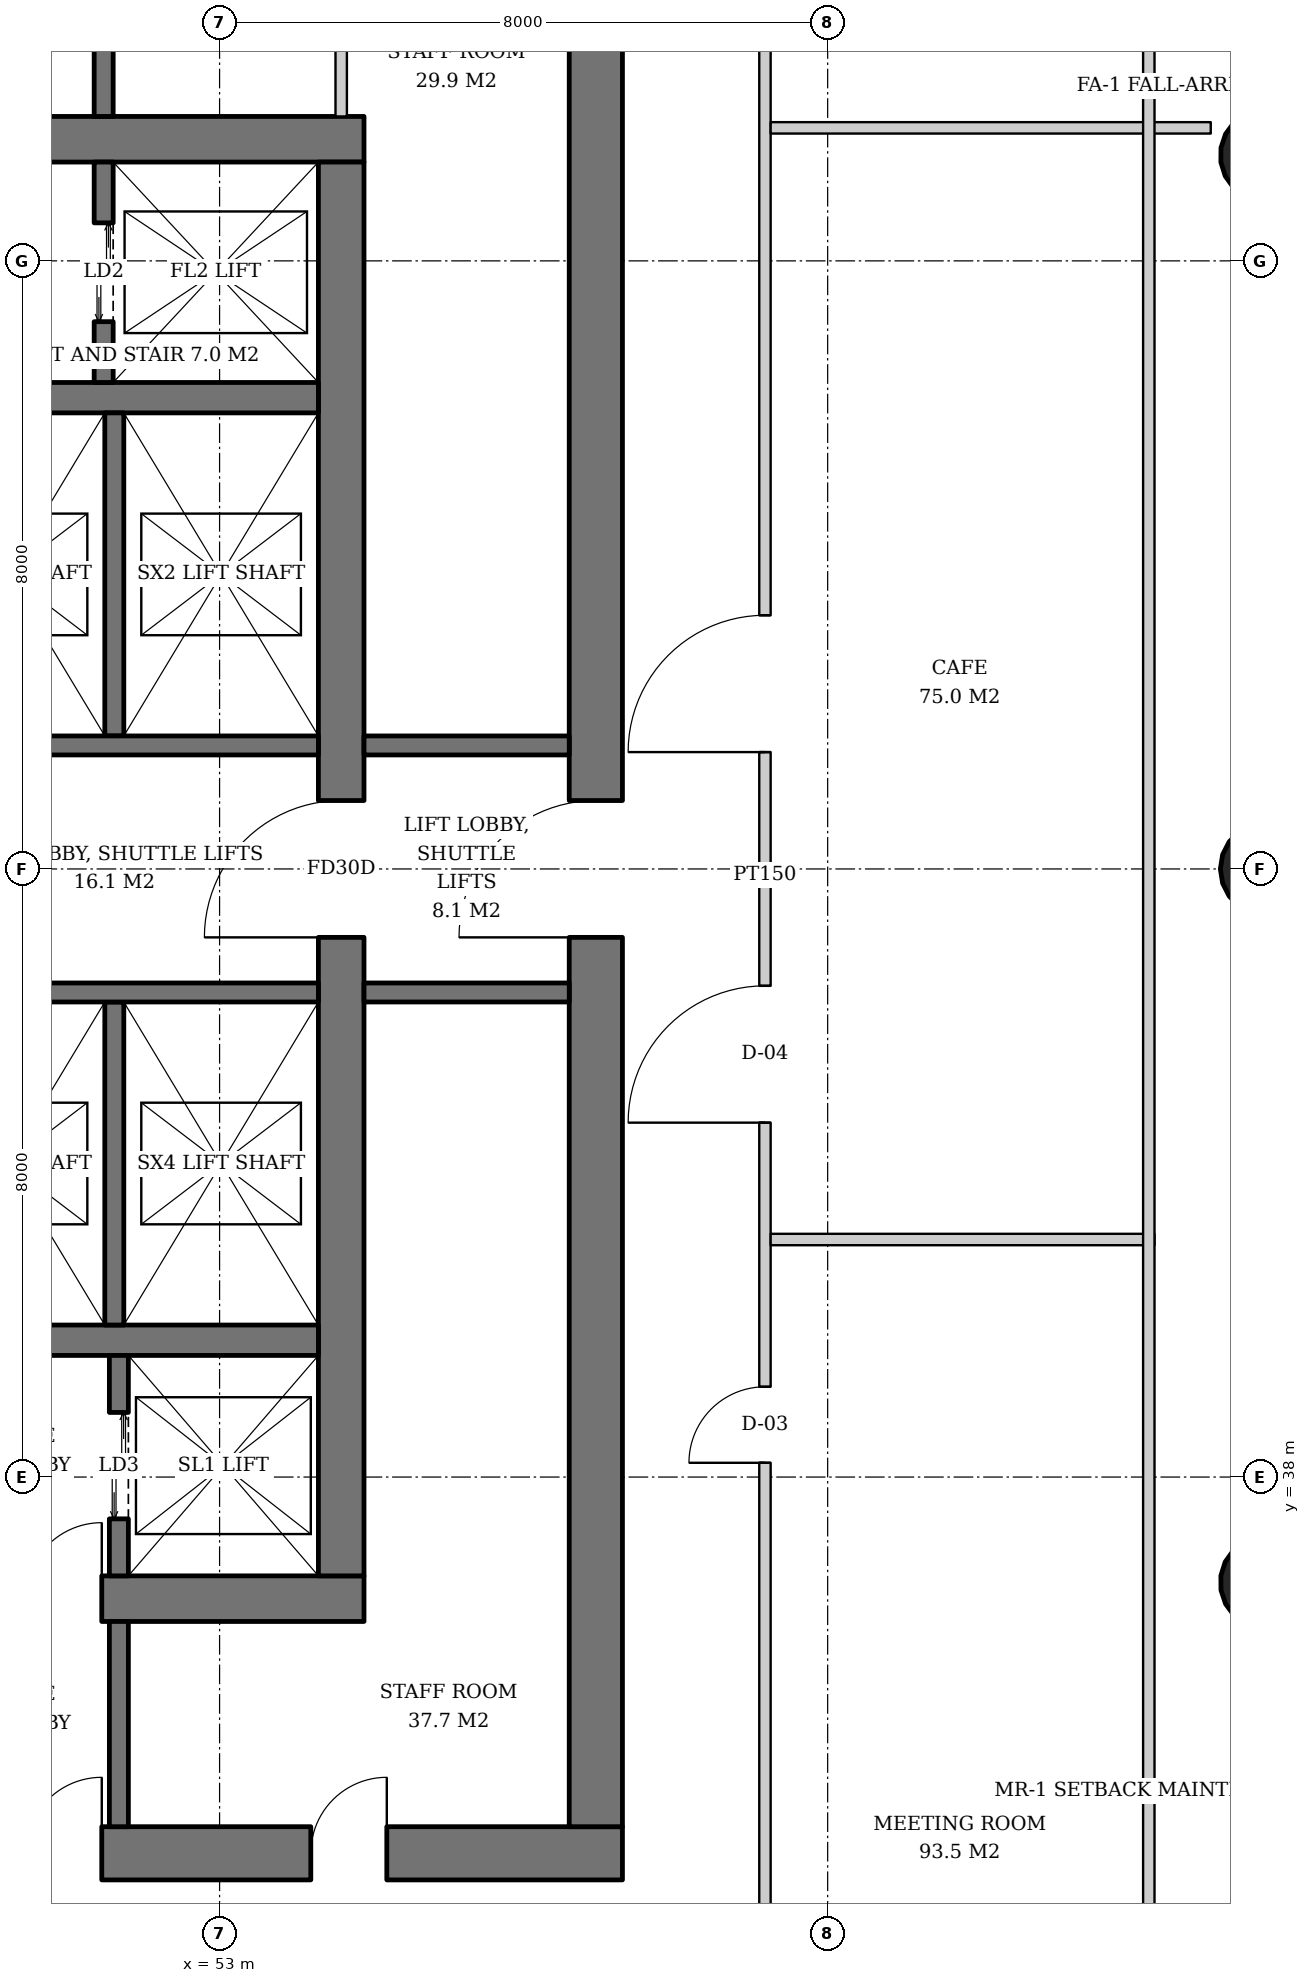
"""IFC4 building model, lengths in metres.
Left out: names, types, materials, properties, quantities, classifications, styles, units other than length and angle.
Written with IfcOpenShell. Run it as: python <this file> out.ifc"""

import sys

from ifc_helpers import new_model, si_unit, direction, frame, frame_2d, origin, origin_2d, place, context, subcontext, project, spatial, rectangle, hollow_circle, extrude, element, fill, save


model = new_model("IFC4")
c1 = context("Model", 3, precision=1e-05, world=origin(), true_north=direction((0.0, 1.0)))
c2 = subcontext(c1, "Body", "Model", "MODEL_VIEW")
j1 = project(units=[si_unit("LENGTHUNIT", "METRE"), si_unit("PLANEANGLEUNIT", "RADIAN")], contexts=[c1])
p1 = place(None, origin())
s1 = spatial("IfcSite", under=j1, at=p1, CompositionType="ELEMENT")
p2 = place(p1, origin())
s2 = spatial("IfcBuilding", under=s1, at=p2, CompositionType="ELEMENT")
p3 = place(p2, frame((0.0, 0.0, 89.4)))
s3 = spatial("IfcBuildingStorey", under=s2, at=p3, CompositionType="ELEMENT", Elevation=89.4)
p4 = place(p3, frame((66.814, 36.593, 0.0), z_axis=(-0.031910269556, 0.015987237665, 0.999362868496), x_axis=(-0.447933021895, -0.894067115991, 0.0)))
e1 = element("IfcColumn", 1, at=p4, inside=s3, PredefinedType="COLUMN", context=c2, shape_type="SweptSolid", body=[
    extrude(hollow_circle(Radius=0.61, WallThickness=0.04, at=origin_2d()), origin(), (0.0, 0.0, 1.0), 3.802),
])
p5 = place(p3, frame((66.814, 46.0, 0.0), z_axis=(-0.031914348339, 0.0, 0.999490607445), x_axis=(0.0, -1.0, 0.0)))
e2 = element("IfcColumn", 2, at=p5, inside=s3, PredefinedType="COLUMN", context=c2, shape_type="SweptSolid", body=[
    extrude(hollow_circle(Radius=0.61, WallThickness=0.04, at=origin_2d()), origin(), (0.0, 0.0, 1.0), 3.802),
])
p6 = place(p3, frame((66.814, 55.407, 0.0), z_axis=(-0.031910269556, -0.015987237665, 0.999362868496), x_axis=(0.447933021895, -0.894067115991, 0.0)))
e3 = element("IfcColumn", 3, at=p6, inside=s3, PredefinedType="COLUMN", context=c2, shape_type="SweptSolid", body=[
    extrude(hollow_circle(Radius=0.61, WallThickness=0.04, at=origin_2d()), origin(), (0.0, 0.0, 1.0), 3.802),
])
p7 = place(p3, frame((35.1, 36.4, 0.0), z_axis=(0.0, 0.0, 1.0), x_axis=(1.0, 0.0, 0.0)))
e4 = element("IfcWall", 4, at=p7, inside=s3, PredefinedType="SHEAR", context=c2, shape_type="SweptSolid", body=[
    extrude(rectangle(XDim=19.8, YDim=0.6, at=frame_2d((9.9, 0.0))), origin(), (0.0, 0.0, 1.0), 3.8),
])
p8 = place(p7, frame((3.9, 0.0, 0.0)))
e5 = element("IfcOpeningElement", 5, at=p8, cuts=e4, PredefinedType="OPENING", context=c2, shape_type="SweptSolid", body=[
    extrude(rectangle(XDim=1.0, YDim=2.1, at=frame_2d((0.5, 1.05))), frame((0.0, 0.31, 0.0), z_axis=(0.0, -1.0, 0.0), x_axis=(1.0, 0.0, 0.0)), (0.0, 0.0, 1.0), 0.62),
])
p9 = place(p7, frame((15.35, 0.0, 0.0)))
e6 = element("IfcOpeningElement", 6, at=p9, cuts=e4, PredefinedType="OPENING", context=c2, shape_type="SweptSolid", body=[
    extrude(rectangle(XDim=1.0, YDim=2.1, at=frame_2d((0.5, 1.05))), frame((0.0, 0.31, 0.0), z_axis=(0.0, -1.0, 0.0), x_axis=(1.0, 0.0, 0.0)), (0.0, 0.0, 1.0), 0.62),
])
p10 = place(p3, frame((35.1, 55.6, 0.0), z_axis=(0.0, 0.0, 1.0), x_axis=(1.0, 0.0, 0.0)))
e7 = element("IfcWall", 7, at=p10, inside=s3, PredefinedType="SHEAR", context=c2, shape_type="SweptSolid", body=[
    extrude(rectangle(XDim=19.8, YDim=0.6, at=frame_2d((9.9, 0.0))), origin(), (0.0, 0.0, 1.0), 3.8),
])
p11 = place(p10, frame((14.54, 0.0, 0.0)))
e8 = element("IfcOpeningElement", 8, at=p11, cuts=e7, PredefinedType="OPENING", context=c2, shape_type="SweptSolid", body=[
    extrude(rectangle(XDim=1.0, YDim=2.1, at=frame_2d((0.5, 1.05))), frame((0.0, 0.31, 0.0), z_axis=(0.0, -1.0, 0.0), x_axis=(1.0, 0.0, 0.0)), (0.0, 0.0, 1.0), 0.62),
])
p12 = place(p10, frame((2.425, 0.0, 0.0)))
e9 = element("IfcOpeningElement", 9, at=p12, cuts=e7, PredefinedType="OPENING", context=c2, shape_type="SweptSolid", body=[
    extrude(rectangle(XDim=1.0, YDim=2.1, at=frame_2d((0.5, 1.05))), frame((0.0, 0.31, 0.0), z_axis=(0.0, -1.0, 0.0), x_axis=(1.0, 0.0, 0.0)), (0.0, 0.0, 1.0), 0.62),
])
p13 = place(p3, frame((54.6, 36.7, 0.0), z_axis=(0.0, 0.0, 1.0), x_axis=(0.0, 1.0, 0.0)))
e10 = element("IfcWall", 10, at=p13, inside=s3, PredefinedType="SHEAR", context=c2, shape_type="SweptSolid", body=[
    extrude(rectangle(XDim=18.6, YDim=0.6, at=frame_2d((9.3, 0.0))), origin(), (0.0, 0.0, 1.0), 3.8),
])
p14 = place(p13, frame((8.4, 0.0, 0.0)))
e11 = element("IfcOpeningElement", 11, at=p14, cuts=e10, PredefinedType="OPENING", context=c2, shape_type="SweptSolid", body=[
    extrude(rectangle(XDim=1.8, YDim=2.4, at=frame_2d((0.9, 1.2))), frame((0.0, 0.31, 0.0), z_axis=(0.0, -1.0, 0.0), x_axis=(1.0, 0.0, 0.0)), (0.0, 0.0, 1.0), 0.62),
])
p15 = place(p3, frame((31.7, 33.05, 0.0), z_axis=(0.0, 0.0, 1.0), x_axis=(1.0, 0.0, 0.0)))
e12 = element("IfcWall", 12, at=p15, inside=s3, PredefinedType="SHEAR", context=c2, shape_type="SweptSolid", body=[
    extrude(rectangle(XDim=26.6, YDim=0.7, at=frame_2d((13.3, 0.0))), origin(), (0.0, 0.0, 1.0), 3.8),
])
p16 = place(p15, frame((7.3, 0.0, 0.0)))
e13 = element("IfcOpeningElement", 13, at=p16, cuts=e12, PredefinedType="OPENING", context=c2, shape_type="SweptSolid", body=[
    extrude(rectangle(XDim=1.0, YDim=2.1, at=frame_2d((0.5, 1.05))), frame((0.0, 0.36, 0.0), z_axis=(0.0, -1.0, 0.0), x_axis=(1.0, 0.0, 0.0)), (0.0, 0.0, 1.0), 0.72),
])
p17 = place(p15, frame((18.75, 0.0, 0.0)))
e14 = element("IfcOpeningElement", 14, at=p17, cuts=e12, PredefinedType="OPENING", context=c2, shape_type="SweptSolid", body=[
    extrude(rectangle(XDim=1.0, YDim=2.1, at=frame_2d((0.5, 1.05))), frame((0.0, 0.36, 0.0), z_axis=(0.0, -1.0, 0.0), x_axis=(1.0, 0.0, 0.0)), (0.0, 0.0, 1.0), 0.72),
])
p18 = place(p15, frame((3.2, 0.0, 0.0)))
e15 = element("IfcOpeningElement", 15, at=p18, cuts=e12, PredefinedType="OPENING", context=c2, shape_type="SweptSolid", body=[
    extrude(rectangle(XDim=1.0, YDim=2.1, at=frame_2d((0.5, 1.05))), frame((0.0, 0.36, 0.0), z_axis=(0.0, -1.0, 0.0), x_axis=(1.0, 0.0, 0.0)), (0.0, 0.0, 1.0), 0.72),
])
p19 = place(p15, frame((10.42, 0.0, 0.0)))
e16 = element("IfcOpeningElement", 16, at=p19, cuts=e12, PredefinedType="OPENING", context=c2, shape_type="SweptSolid", body=[
    extrude(rectangle(XDim=1.0, YDim=2.1, at=frame_2d((0.5, 1.05))), frame((0.0, 0.36, 0.0), z_axis=(0.0, -1.0, 0.0), x_axis=(1.0, 0.0, 0.0)), (0.0, 0.0, 1.0), 0.72),
])
p20 = place(p15, frame((14.46, 0.0, 0.0)))
e17 = element("IfcOpeningElement", 17, at=p20, cuts=e12, PredefinedType="OPENING", context=c2, shape_type="SweptSolid", body=[
    extrude(rectangle(XDim=1.0, YDim=2.1, at=frame_2d((0.5, 1.05))), frame((0.0, 0.36, 0.0), z_axis=(0.0, -1.0, 0.0), x_axis=(1.0, 0.0, 0.0)), (0.0, 0.0, 1.0), 0.72),
])
p21 = place(p15, frame((22.5, 0.0, 0.0)))
e18 = element("IfcOpeningElement", 18, at=p21, cuts=e12, PredefinedType="OPENING", context=c2, shape_type="SweptSolid", body=[
    extrude(rectangle(XDim=1.0, YDim=2.1, at=frame_2d((0.5, 1.05))), frame((0.0, 0.36, 0.0), z_axis=(0.0, -1.0, 0.0), x_axis=(1.0, 0.0, 0.0)), (0.0, 0.0, 1.0), 0.72),
])
p22 = place(p3, frame((57.95, 33.4, 0.0), z_axis=(0.0, 0.0, 1.0), x_axis=(0.0, 1.0, 0.0)))
e19 = element("IfcWall", 19, at=p22, inside=s3, PredefinedType="SHEAR", context=c2, shape_type="SweptSolid", body=[
    extrude(rectangle(XDim=25.2, YDim=0.7, at=frame_2d((12.6, 0.0))), origin(), (0.0, 0.0, 1.0), 3.8),
])
p23 = place(p22, frame((11.7, 0.0, 0.0)))
e20 = element("IfcOpeningElement", 20, at=p23, cuts=e19, PredefinedType="OPENING", context=c2, shape_type="SweptSolid", body=[
    extrude(rectangle(XDim=1.8, YDim=2.4, at=frame_2d((0.9, 1.2))), frame((0.0, 0.36, 0.0), z_axis=(0.0, -1.0, 0.0), x_axis=(1.0, 0.0, 0.0)), (0.0, 0.0, 1.0), 0.72),
])
for number, where, z_axis, x_axis in (
    (21, (35.7, 39.8, 0.0), (0.0, 0.0, 1.0), (1.0, 0.0, 0.0)),
    (22, (35.7, 52.2, 0.0), (0.0, 0.0, 1.0), (1.0, 0.0, 0.0)),
):
    element("IfcWall", number, at=place(p3, frame(where, z_axis=z_axis, x_axis=x_axis)), inside=s3, PredefinedType="SHEAR", context=c2, shape_type="SweptSolid", body=[
        extrude(rectangle(XDim=18.6, YDim=0.4, at=frame_2d((9.3, 0.0))), origin(), (0.0, 0.0, 1.0), 3.8),
    ])
p24 = place(p3, frame((51.675, 36.7, 0.0), z_axis=(0.0, 0.0, 1.0), x_axis=(0.0, 1.0, 0.0)))
e23 = element("IfcWall", 23, at=p24, inside=s3, PredefinedType="SHEAR", context=c2, shape_type="SweptSolid", body=[
    extrude(rectangle(XDim=2.9, YDim=0.25, at=frame_2d((1.45, 0.0))), origin(), (0.0, 0.0, 1.0), 3.8),
])
p25 = place(p24, frame((0.75, 0.0, 0.0)))
e24 = element("IfcOpeningElement", 24, at=p25, cuts=e23, PredefinedType="OPENING", context=c2, shape_type="SweptSolid", body=[
    extrude(rectangle(XDim=1.4, YDim=2.4, at=frame_2d((0.7, 1.2))), frame((0.0, 0.135, 0.0), z_axis=(0.0, -1.0, 0.0), x_axis=(1.0, 0.0, 0.0)), (0.0, 0.0, 1.0), 0.27),
])
p26 = place(p3, frame((51.475, 52.4, 0.0), z_axis=(0.0, 0.0, 1.0), x_axis=(0.0, 1.0, 0.0)))
e25 = element("IfcWall", 25, at=p26, inside=s3, PredefinedType="SHEAR", context=c2, shape_type="SweptSolid", body=[
    extrude(rectangle(XDim=2.9, YDim=0.25, at=frame_2d((1.45, 0.0))), origin(), (0.0, 0.0, 1.0), 3.8),
])
p27 = place(p26, frame((0.8, 0.0, 0.0)))
e26 = element("IfcOpeningElement", 26, at=p27, cuts=e25, PredefinedType="OPENING", context=c2, shape_type="SweptSolid", body=[
    extrude(rectangle(XDim=1.3, YDim=2.2, at=frame_2d((0.65, 1.1))), frame((0.0, 0.135, 0.0), z_axis=(0.0, -1.0, 0.0), x_axis=(1.0, 0.0, 0.0)), (0.0, 0.0, 1.0), 0.27),
])
p28 = place(p3, frame((51.615, 47.75, 0.0), z_axis=(0.0, 0.0, 1.0), x_axis=(0.0, 1.0, 0.0)))
e27 = element("IfcWall", 27, at=p28, inside=s3, PredefinedType="SHEAR", context=c2, shape_type="SweptSolid", body=[
    extrude(rectangle(XDim=4.25, YDim=0.25, at=frame_2d((2.125, 0.0))), origin(), (0.0, 0.0, 1.0), 3.8),
])
p29 = place(p3, frame((48.93, 47.625, 0.0), z_axis=(0.0, 0.0, 1.0), x_axis=(1.0, 0.0, 0.0)))
e28 = element("IfcWall", 28, at=p29, inside=s3, PredefinedType="SHEAR", context=c2, shape_type="SweptSolid", body=[
    extrude(rectangle(XDim=5.37, YDim=0.25, at=frame_2d((2.685, 0.0))), origin(), (0.0, 0.0, 1.0), 3.8),
])
p30 = place(p3, frame((51.615, 44.25, 0.0), z_axis=(0.0, 0.0, 1.0), x_axis=(0.0, -1.0, 0.0)))
e29 = element("IfcWall", 29, at=p30, inside=s3, PredefinedType="SHEAR", context=c2, shape_type="SweptSolid", body=[
    extrude(rectangle(XDim=4.25, YDim=0.25, at=frame_2d((2.125, 0.0))), origin(), (0.0, 0.0, 1.0), 3.8),
])
p31 = place(p3, frame((48.93, 44.375, 0.0), z_axis=(0.0, 0.0, 1.0), x_axis=(1.0, 0.0, 0.0)))
e30 = element("IfcWall", 30, at=p31, inside=s3, PredefinedType="SHEAR", context=c2, shape_type="SweptSolid", body=[
    extrude(rectangle(XDim=5.37, YDim=0.25, at=frame_2d((2.685, 0.0))), origin(), (0.0, 0.0, 1.0), 3.8),
])
for number, where, z_axis, x_axis in (
    (31, (51.475, 55.9, 0.0), (0.0, 0.0, 1.0), (0.0, 1.0, 0.0)),
    (32, (54.9, 44.375, 0.0), (0.0, 0.0, 1.0), (1.0, 0.0, 0.0)),
    (33, (54.9, 47.625, 0.0), (0.0, 0.0, 1.0), (1.0, 0.0, 0.0)),
    (34, (51.675, 33.4, 0.0), (0.0, 0.0, 1.0), (0.0, 1.0, 0.0)),
):
    element("IfcWall", number, at=place(p3, frame(where, z_axis=z_axis, x_axis=x_axis)), inside=s3, PredefinedType="SOLIDWALL", context=c2, shape_type="SweptSolid", body=[
        extrude(rectangle(XDim=2.7, YDim=0.25, at=frame_2d((1.35, 0.0))), origin(), (0.0, 0.0, 1.0), 3.62),
    ])
p32 = place(p3, frame((54.6, 55.9, 0.0), z_axis=(0.0, 0.0, 1.0), x_axis=(0.0, 1.0, 0.0)))
e35 = element("IfcWall", 35, at=p32, inside=s3, PredefinedType="SOLIDWALL", context=c2, shape_type="SweptSolid", body=[
    extrude(rectangle(XDim=2.7, YDim=0.15, at=frame_2d((1.35, 0.0))), origin(), (0.0, 0.0, 1.0), 3.62),
])
p33 = place(p3, frame((60.175, 30.75, 0.0), z_axis=(0.0, 0.0, 1.0), x_axis=(0.0, 1.0, 0.0)))
e36 = element("IfcWall", 36, at=p33, inside=s3, PredefinedType="PARTITIONING", context=c2, shape_type="SweptSolid", body=[
    extrude(rectangle(XDim=30.35, YDim=0.15, at=frame_2d((15.175, 0.0))), origin(), (0.0, 0.0, 1.0), 2.612),
])
p34 = place(p33, frame((7.438, 0.0, 0.0)))
e37 = element("IfcOpeningElement", 37, at=p34, cuts=e36, PredefinedType="OPENING", context=c2, shape_type="SweptSolid", body=[
    extrude(rectangle(XDim=1.0, YDim=2.1, at=frame_2d((0.5, 1.05))), frame((0.0, 0.085, 0.0), z_axis=(0.0, -1.0, 0.0), x_axis=(1.0, 0.0, 0.0)), (0.0, 0.0, 1.0), 0.17),
])
p35 = place(p33, frame((11.913, 0.0, 0.0)))
e38 = element("IfcOpeningElement", 38, at=p35, cuts=e36, PredefinedType="OPENING", context=c2, shape_type="SweptSolid", body=[
    extrude(rectangle(XDim=1.8, YDim=2.4, at=frame_2d((0.9, 1.2))), frame((0.0, 0.085, 0.0), z_axis=(0.0, -1.0, 0.0), x_axis=(1.0, 0.0, 0.0)), (0.0, 0.0, 1.0), 0.17),
])
p36 = place(p33, frame((16.788, 0.0, 0.0)))
e39 = element("IfcOpeningElement", 39, at=p36, cuts=e36, PredefinedType="OPENING", context=c2, shape_type="SweptSolid", body=[
    extrude(rectangle(XDim=1.8, YDim=2.4, at=frame_2d((0.9, 1.2))), frame((0.0, 0.085, 0.0), z_axis=(0.0, -1.0, 0.0), x_axis=(1.0, 0.0, 0.0)), (0.0, 0.0, 1.0), 0.17),
])
p37 = place(p3, frame((60.25, 41.125, 0.0), z_axis=(0.0, 0.0, 1.0), x_axis=(1.0, 0.0, 0.0)))
e40 = element("IfcWall", 40, at=p37, inside=s3, PredefinedType="PARTITIONING", context=c2, shape_type="SweptSolid", body=[
    extrude(rectangle(XDim=5.05, YDim=0.15, at=frame_2d((2.525, 0.0))), origin(), (0.0, 0.0, 1.0), 3.62),
])
p38 = place(p3, frame((60.25, 55.75, 0.0), z_axis=(0.0, 0.0, 1.0), x_axis=(1.0, 0.0, 0.0)))
e41 = element("IfcWall", 41, at=p38, inside=s3, PredefinedType="PARTITIONING", context=c2, shape_type="SweptSolid", body=[
    extrude(rectangle(XDim=5.79, YDim=0.15, at=frame_2d((2.895, 0.0))), origin(), (0.0, 0.0, 1.0), 3.62),
])
p39 = place(p3, frame((65.225, 63.3, 0.0), z_axis=(0.0, 0.0, 1.0), x_axis=(0.0, -1.0, 0.0)))
e42 = element("IfcWall", 42, at=p39, inside=s3, PredefinedType="PARTITIONING", context=c2, shape_type="SweptSolid", body=[
    extrude(rectangle(XDim=34.6, YDim=0.15, at=frame_2d((17.3, 0.0))), origin(), (0.0, 0.0, 1.0), 2.612),
])
p40 = place(p25, origin())
e43 = element("IfcDoor", 43, at=p40, inside=s3, OperationType="DOUBLE_DOOR_SLIDING", PredefinedType="DOOR", context=c2, shape_type="SweptSolid", body=[
    extrude(rectangle(XDim=1.4, YDim=2.4, at=frame_2d((0.7, 1.2))), frame((0.0, 0.025, 0.0), z_axis=(0.0, -1.0, 0.0), x_axis=(1.0, 0.0, 0.0)), (0.0, 0.0, 1.0), 0.05),
])
fill(e24, e43)
p41 = place(p27, origin())
e44 = element("IfcDoor", 44, at=p41, inside=s3, OperationType="DOUBLE_DOOR_SLIDING", PredefinedType="DOOR", context=c2, shape_type="SweptSolid", body=[
    extrude(rectangle(XDim=1.3, YDim=2.2, at=frame_2d((0.65, 1.1))), frame((0.0, 0.025, 0.0), z_axis=(0.0, -1.0, 0.0), x_axis=(1.0, 0.0, 0.0)), (0.0, 0.0, 1.0), 0.05),
])
fill(e26, e44)
p42 = place(p14, origin())
e45 = element("IfcDoor", 45, at=p42, inside=s3, OperationType="DOUBLE_DOOR_SINGLE_SWING", PredefinedType="DOOR", context=c2, shape_type="SweptSolid", body=[
    extrude(rectangle(XDim=1.8, YDim=2.4, at=frame_2d((0.9, 1.2))), frame((0.0, 0.025, 0.0), z_axis=(0.0, -1.0, 0.0), x_axis=(1.0, 0.0, 0.0)), (0.0, 0.0, 1.0), 0.05),
])
fill(e11, e45)
p43 = place(p9, origin())
e46 = element("IfcDoor", 46, at=p43, inside=s3, OperationType="SINGLE_SWING_RIGHT", PredefinedType="DOOR", context=c2, shape_type="SweptSolid", body=[
    extrude(rectangle(XDim=1.0, YDim=2.1, at=frame_2d((0.5, 1.05))), frame((0.0, 0.025, 0.0), z_axis=(0.0, -1.0, 0.0), x_axis=(1.0, 0.0, 0.0)), (0.0, 0.0, 1.0), 0.05),
])
fill(e6, e46)
p44 = place(p23, origin())
e47 = element("IfcDoor", 47, at=p44, inside=s3, OperationType="DOUBLE_DOOR_SINGLE_SWING", PredefinedType="DOOR", context=c2, shape_type="SweptSolid", body=[
    extrude(rectangle(XDim=1.8, YDim=2.4, at=frame_2d((0.9, 1.2))), frame((0.0, 0.025, 0.0), z_axis=(0.0, -1.0, 0.0), x_axis=(1.0, 0.0, 0.0)), (0.0, 0.0, 1.0), 0.05),
])
fill(e20, e47)
p45 = place(p17, origin())
e48 = element("IfcDoor", 48, at=p45, inside=s3, OperationType="SINGLE_SWING_RIGHT", PredefinedType="DOOR", context=c2, shape_type="SweptSolid", body=[
    extrude(rectangle(XDim=1.0, YDim=2.1, at=frame_2d((0.5, 1.05))), frame((0.0, 0.025, 0.0), z_axis=(0.0, -1.0, 0.0), x_axis=(1.0, 0.0, 0.0)), (0.0, 0.0, 1.0), 0.05),
])
fill(e14, e48)
p46 = place(p21, origin())
e49 = element("IfcDoor", 49, at=p46, inside=s3, OperationType="SINGLE_SWING_RIGHT", PredefinedType="DOOR", context=c2, shape_type="SweptSolid", body=[
    extrude(rectangle(XDim=1.0, YDim=2.1, at=frame_2d((0.5, 1.05))), frame((0.0, 0.34, 0.0), z_axis=(0.0, -1.0, 0.0), x_axis=(1.0, 0.0, 0.0)), (0.0, 0.0, 1.0), 0.05),
])
fill(e18, e49)
p47 = place(p34, origin())
e50 = element("IfcDoor", 50, at=p47, inside=s3, OperationType="SINGLE_SWING_LEFT", PredefinedType="DOOR", context=c2, shape_type="SweptSolid", body=[
    extrude(rectangle(XDim=1.0, YDim=2.1, at=frame_2d((0.5, 1.05))), frame((0.0, 0.025, 0.0), z_axis=(0.0, -1.0, 0.0), x_axis=(1.0, 0.0, 0.0)), (0.0, 0.0, 1.0), 0.05),
])
fill(e37, e50)
p48 = place(p35, origin())
e51 = element("IfcDoor", 51, at=p48, inside=s3, OperationType="DOUBLE_DOOR_SINGLE_SWING", PredefinedType="DOOR", context=c2, shape_type="SweptSolid", body=[
    extrude(rectangle(XDim=1.8, YDim=2.4, at=frame_2d((0.9, 1.2))), frame((0.0, 0.025, 0.0), z_axis=(0.0, -1.0, 0.0), x_axis=(1.0, 0.0, 0.0)), (0.0, 0.0, 1.0), 0.05),
])
fill(e38, e51)
p49 = place(p36, origin())
e52 = element("IfcDoor", 52, at=p49, inside=s3, OperationType="DOUBLE_DOOR_SINGLE_SWING", PredefinedType="DOOR", context=c2, shape_type="SweptSolid", body=[
    extrude(rectangle(XDim=1.8, YDim=2.4, at=frame_2d((0.9, 1.2))), frame((0.0, 0.025, 0.0), z_axis=(0.0, -1.0, 0.0), x_axis=(1.0, 0.0, 0.0)), (0.0, 0.0, 1.0), 0.05),
])
fill(e39, e52)
save(model, sys.argv[1])
